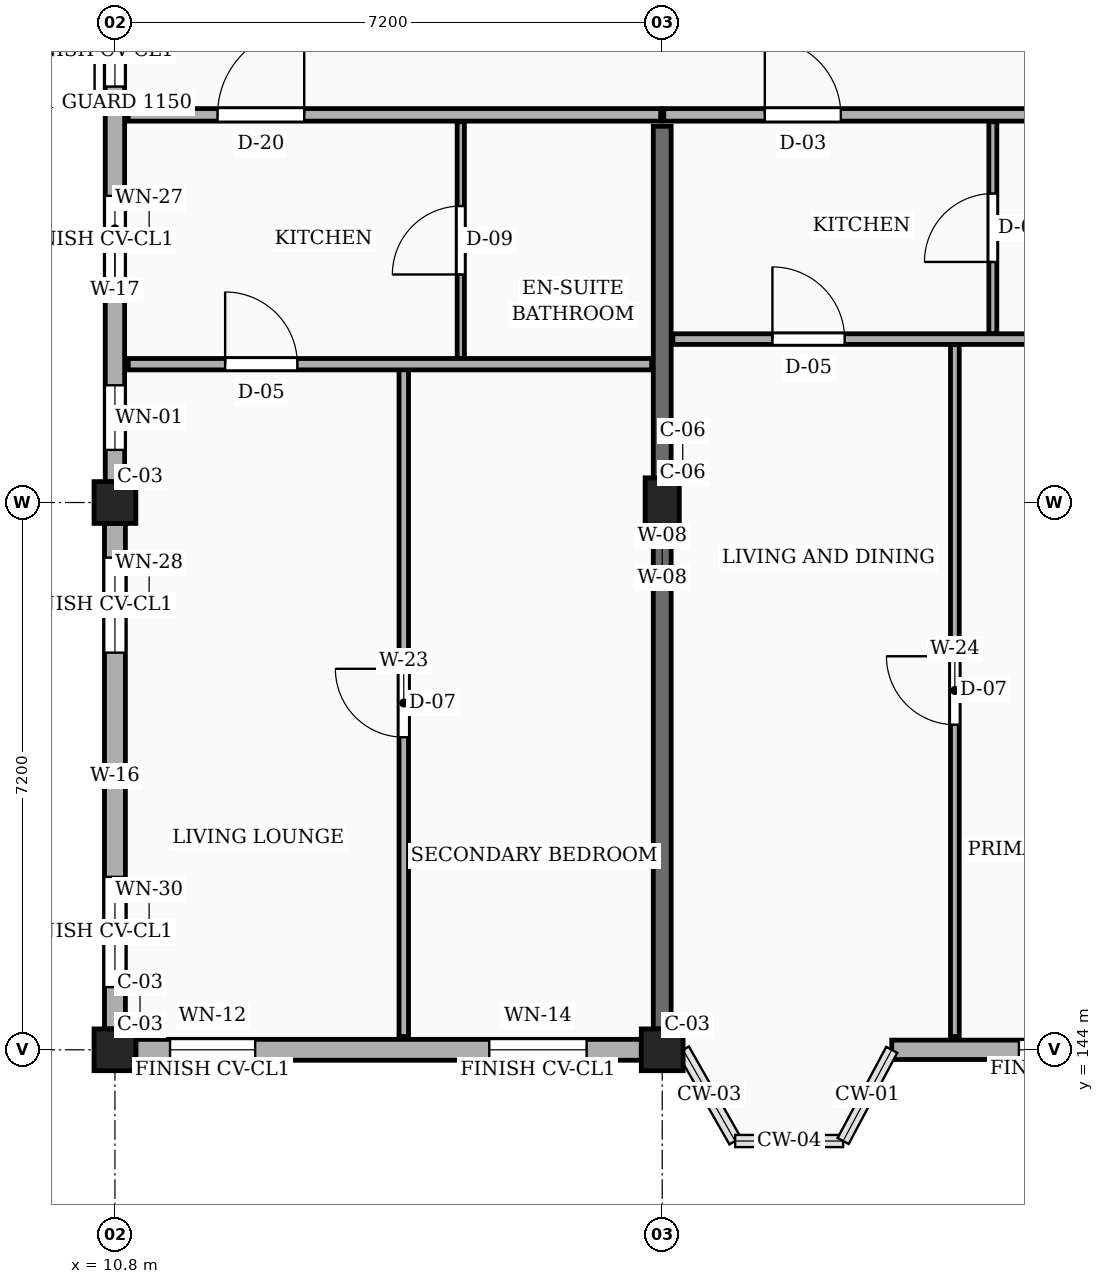
"""IFC4 building model, lengths in metres.
Left out: names, types, materials, properties, quantities, classifications, styles, units other than length and angle.
Written with IfcOpenShell. Run it as: python <this file> out.ifc"""

import sys

from ifc_helpers import new_model, si_unit, direction, frame, frame_2d, origin, origin_2d, place, context, subcontext, project, spatial, rectangle, extrude, element, fill, save


model = new_model("IFC4")
c1 = context("Model", 3, precision=1e-05, world=origin(), true_north=direction((0.0, 1.0)))
c2 = subcontext(c1, "Body", "Model", "MODEL_VIEW")
j1 = project(units=[si_unit("LENGTHUNIT", "METRE"), si_unit("PLANEANGLEUNIT", "RADIAN")], contexts=[c1])
p1 = place(None, origin())
s1 = spatial("IfcSite", under=j1, at=p1, CompositionType="ELEMENT")
p2 = place(p1, origin())
s2 = spatial("IfcBuilding", under=s1, at=p2, CompositionType="ELEMENT")
p3 = place(p2, frame((0.0, 0.0, 13.95)))
s3 = spatial("IfcBuildingStorey", under=s2, at=p3, CompositionType="ELEMENT", Elevation=13.95)
for number, where, z_axis, x_axis in (
    (1, (10.8, 144.0, 0.0), (0.0, 0.0, 1.0), (1.0, 0.0, 0.0)),
    (2, (10.8, 151.2, 0.0), (0.0, 0.0, 1.0), (1.0, 0.0, 0.0)),
    (3, (18.0, 144.0, 0.0), (0.0, 0.0, 1.0), (1.0, 0.0, 0.0)),
):
    element("IfcColumn", number, at=place(p3, frame(where, z_axis=z_axis, x_axis=x_axis)), inside=s3, PredefinedType="COLUMN", context=c2, shape_type="SweptSolid", body=[
        extrude(rectangle(XDim=0.55, YDim=0.55, at=origin_2d()), origin(), (0.0, 0.0, 1.0), 3.15),
    ])
p4 = place(p3, frame((18.0, 151.2, 0.0), z_axis=(0.0, 0.0, 1.0), x_axis=(1.0, 0.0, 0.0)))
e4 = element("IfcColumn", 4, at=p4, inside=s3, PredefinedType="COLUMN", context=c2, shape_type="SweptSolid", body=[
    extrude(rectangle(XDim=0.45, YDim=0.65, at=origin_2d()), origin(), (0.0, 0.0, 1.0), 3.15),
])
p5 = place(p3, frame((18.0, 144.275, 0.0), z_axis=(0.0, 0.0, 1.0), x_axis=(0.0, 1.0, 0.0)))
e5 = element("IfcWall", 5, at=p5, inside=s3, PredefinedType="SOLIDWALL", context=c2, shape_type="SweptSolid", body=[
    extrude(rectangle(XDim=11.875, YDim=0.235, at=frame_2d((5.938, 0.0))), origin(), (0.0, 0.0, 1.0), 2.185),
])
p6 = place(p3, frame((11.075, 144.0, 0.0), z_axis=(0.0, 0.0, 1.0), x_axis=(1.0, 0.0, 0.0)))
e6 = element("IfcWall", 6, at=p6, inside=s3, PredefinedType="SOLIDWALL", context=c2, shape_type="SweptSolid", body=[
    extrude(rectangle(XDim=6.65, YDim=0.275, at=frame_2d((3.325, 0.0))), origin(), (0.0, 0.0, 1.0), 2.455),
])
p7 = place(p6, frame((0.45, 0.0, 0.78)))
e7 = element("IfcOpeningElement", 7, at=p7, cuts=e6, PredefinedType="OPENING", context=c2, shape_type="SweptSolid", body=[
    extrude(rectangle(XDim=1.12, YDim=1.26, at=frame_2d((0.56, 0.63))), frame((0.0, 0.147, 0.0), z_axis=(0.0, -1.0, 0.0), x_axis=(1.0, 0.0, 0.0)), (0.0, 0.0, 1.0), 0.295),
])
p8 = place(p6, frame((4.65, 0.0, 0.78)))
e8 = element("IfcOpeningElement", 8, at=p8, cuts=e6, PredefinedType="OPENING", context=c2, shape_type="SweptSolid", body=[
    extrude(rectangle(XDim=1.28, YDim=1.26, at=frame_2d((0.64, 0.63))), frame((0.0, 0.147, 0.0), z_axis=(0.0, -1.0, 0.0), x_axis=(1.0, 0.0, 0.0)), (0.0, 0.0, 1.0), 0.295),
])
p9 = place(p3, frame((21.02, 144.0, 0.0), z_axis=(0.0, 0.0, 1.0), x_axis=(1.0, 0.0, 0.0)))
e9 = element("IfcWall", 9, at=p9, inside=s3, PredefinedType="SOLIDWALL", context=c2, shape_type="SweptSolid", body=[
    extrude(rectangle(XDim=3.905, YDim=0.255, at=frame_2d((1.953, 0.0))), origin(), (0.0, 0.0, 1.0), 2.455),
])
p10 = place(p9, frame((1.673, 0.0, 0.78)))
e10 = element("IfcOpeningElement", 10, at=p10, cuts=e9, PredefinedType="OPENING", context=c2, shape_type="SweptSolid", body=[
    extrude(rectangle(XDim=1.28, YDim=1.26, at=frame_2d((0.64, 0.63))), frame((0.0, 0.137, 0.0), z_axis=(0.0, -1.0, 0.0), x_axis=(1.0, 0.0, 0.0)), (0.0, 0.0, 1.0), 0.275),
])
p11 = place(p3, frame((10.8, 158.125, 0.0), z_axis=(0.0, 0.0, 1.0), x_axis=(0.0, -1.0, 0.0)))
e11 = element("IfcWall", 11, at=p11, inside=s3, PredefinedType="SOLIDWALL", context=c2, shape_type="SweptSolid", body=[
    extrude(rectangle(XDim=6.65, YDim=0.255, at=frame_2d((3.325, 0.0))), origin(), (0.0, 0.0, 1.0), 2.455),
])
p12 = place(p11, frame((0.512, 0.0, 0.78)))
e12 = element("IfcOpeningElement", 12, at=p12, cuts=e11, PredefinedType="OPENING", context=c2, shape_type="SweptSolid", body=[
    extrude(rectangle(XDim=0.94, YDim=1.44, at=frame_2d((0.47, 0.72))), frame((0.0, 0.137, 0.0), z_axis=(0.0, -1.0, 0.0), x_axis=(1.0, 0.0, 0.0)), (0.0, 0.0, 1.0), 0.275),
])
p13 = place(p11, frame((2.89, 0.0, 0.78)))
e13 = element("IfcOpeningElement", 13, at=p13, cuts=e11, PredefinedType="OPENING", context=c2, shape_type="SweptSolid", body=[
    extrude(rectangle(XDim=1.15, YDim=1.44, at=frame_2d((0.575, 0.72))), frame((0.0, 0.137, 0.0), z_axis=(0.0, -1.0, 0.0), x_axis=(1.0, 0.0, 0.0)), (0.0, 0.0, 1.0), 0.275),
])
p14 = place(p11, frame((5.383, 0.0, 0.78)))
e14 = element("IfcOpeningElement", 14, at=p14, cuts=e11, PredefinedType="OPENING", context=c2, shape_type="SweptSolid", body=[
    extrude(rectangle(XDim=0.85, YDim=1.15, at=frame_2d((0.425, 0.575))), frame((0.0, 0.137, 0.0), z_axis=(0.0, -1.0, 0.0), x_axis=(1.0, 0.0, 0.0)), (0.0, 0.0, 1.0), 0.275),
])
p15 = place(p3, frame((10.8, 150.925, 0.0), z_axis=(0.0, 0.0, 1.0), x_axis=(0.0, -1.0, 0.0)))
e15 = element("IfcWall", 15, at=p15, inside=s3, PredefinedType="SOLIDWALL", context=c2, shape_type="SweptSolid", body=[
    extrude(rectangle(XDim=6.65, YDim=0.275, at=frame_2d((3.325, 0.0))), origin(), (0.0, 0.0, 1.0), 2.455),
])
p16 = place(p15, frame((0.45, 0.0, 0.78)))
e16 = element("IfcOpeningElement", 16, at=p16, cuts=e15, PredefinedType="OPENING", context=c2, shape_type="SweptSolid", body=[
    extrude(rectangle(XDim=1.25, YDim=1.44, at=frame_2d((0.625, 0.72))), frame((0.0, 0.147, 0.0), z_axis=(0.0, -1.0, 0.0), x_axis=(1.0, 0.0, 0.0)), (0.0, 0.0, 1.0), 0.295),
])
p17 = place(p15, frame((4.65, 0.0, 0.78)))
e17 = element("IfcOpeningElement", 17, at=p17, cuts=e15, PredefinedType="OPENING", context=c2, shape_type="SweptSolid", body=[
    extrude(rectangle(XDim=1.45, YDim=1.44, at=frame_2d((0.725, 0.72))), frame((0.0, 0.147, 0.0), z_axis=(0.0, -1.0, 0.0), x_axis=(1.0, 0.0, 0.0)), (0.0, 0.0, 1.0), 0.295),
])
p18 = place(p3, frame((10.975, 156.3, 0.0), z_axis=(0.0, 0.0, 1.0), x_axis=(1.0, 0.0, 0.0)))
e18 = element("IfcWall", 18, at=p18, inside=s3, PredefinedType="PARTITIONING", context=c2, shape_type="SweptSolid", body=[
    extrude(rectangle(XDim=7.005, YDim=0.165, at=frame_2d((3.502, 0.0))), origin(), (0.0, 0.0, 1.0), 2.32),
])
p19 = place(p18, frame((1.175, 0.0, 0.0)))
e19 = element("IfcOpeningElement", 19, at=p19, cuts=e18, PredefinedType="OPENING", context=c2, shape_type="SweptSolid", body=[
    extrude(rectangle(XDim=1.14, YDim=2.18, at=frame_2d((0.57, 1.09))), frame((0.0, 0.093, 0.0), z_axis=(0.0, -1.0, 0.0), x_axis=(1.0, 0.0, 0.0)), (0.0, 0.0, 1.0), 0.185),
])
p20 = place(p3, frame((18.02, 156.3, 0.0), z_axis=(0.0, 0.0, 1.0), x_axis=(1.0, 0.0, 0.0)))
e20 = element("IfcWall", 20, at=p20, inside=s3, PredefinedType="PARTITIONING", context=c2, shape_type="SweptSolid", body=[
    extrude(rectangle(XDim=7.16, YDim=0.165, at=frame_2d((3.58, 0.0))), origin(), (0.0, 0.0, 1.0), 2.32),
])
p21 = place(p20, frame((1.33, 0.0, 0.0)))
e21 = element("IfcOpeningElement", 21, at=p21, cuts=e20, PredefinedType="OPENING", context=c2, shape_type="SweptSolid", body=[
    extrude(rectangle(XDim=1.0, YDim=2.15, at=frame_2d((0.5, 1.075))), frame((0.0, 0.093, 0.0), z_axis=(0.0, -1.0, 0.0), x_axis=(1.0, 0.0, 0.0)), (0.0, 0.0, 1.0), 0.185),
])
p22 = place(p3, frame((14.6, 144.175, 0.0), z_axis=(0.0, 0.0, 1.0), x_axis=(0.0, 1.0, 0.0)))
e22 = element("IfcWall", 22, at=p22, inside=s3, PredefinedType="PARTITIONING", context=c2, shape_type="SweptSolid", body=[
    extrude(rectangle(XDim=8.775, YDim=0.125, at=frame_2d((4.387, 0.0))), origin(), (0.0, 0.0, 1.0), 2.32),
])
p23 = place(p22, frame((3.938, 0.0, 0.0)))
e23 = element("IfcOpeningElement", 23, at=p23, cuts=e22, PredefinedType="OPENING", context=c2, shape_type="SweptSolid", body=[
    extrude(rectangle(XDim=0.9, YDim=2.1, at=frame_2d((0.45, 1.05))), frame((0.0, 0.073, 0.0), z_axis=(0.0, -1.0, 0.0), x_axis=(1.0, 0.0, 0.0)), (0.0, 0.0, 1.0), 0.145),
])
p24 = place(p3, frame((15.35, 153.09, 0.0), z_axis=(0.0, 0.0, 1.0), x_axis=(0.0, 1.0, 0.0)))
e24 = element("IfcWall", 24, at=p24, inside=s3, PredefinedType="PARTITIONING", context=c2, shape_type="SweptSolid", body=[
    extrude(rectangle(XDim=3.12, YDim=0.095, at=frame_2d((1.56, 0.0))), origin(), (0.0, 0.0, 1.0), 2.32),
])
p25 = place(p24, frame((1.11, 0.0, 0.0)))
e25 = element("IfcOpeningElement", 25, at=p25, cuts=e24, PredefinedType="OPENING", context=c2, shape_type="SweptSolid", body=[
    extrude(rectangle(XDim=0.9, YDim=2.05, at=frame_2d((0.45, 1.025))), frame((0.0, 0.058, 0.0), z_axis=(0.0, -1.0, 0.0), x_axis=(1.0, 0.0, 0.0)), (0.0, 0.0, 1.0), 0.115),
])
p26 = place(p3, frame((10.975, 153.02, 0.0), z_axis=(0.0, 0.0, 1.0), x_axis=(1.0, 0.0, 0.0)))
e26 = element("IfcWall", 26, at=p26, inside=s3, PredefinedType="PARTITIONING", context=c2, shape_type="SweptSolid", body=[
    extrude(rectangle(XDim=6.885, YDim=0.15, at=frame_2d((3.442, 0.0))), origin(), (0.0, 0.0, 1.0), 2.32),
])
p27 = place(p26, frame((1.275, 0.0, 0.0)))
e27 = element("IfcOpeningElement", 27, at=p27, cuts=e26, PredefinedType="OPENING", context=c2, shape_type="SweptSolid", body=[
    extrude(rectangle(XDim=0.95, YDim=2.1, at=frame_2d((0.475, 1.05))), frame((0.0, 0.085, 0.0), z_axis=(0.0, -1.0, 0.0), x_axis=(1.0, 0.0, 0.0)), (0.0, 0.0, 1.0), 0.17),
])
p28 = place(p3, frame((21.85, 144.175, 0.0), z_axis=(0.0, 0.0, 1.0), x_axis=(0.0, 1.0, 0.0)))
e28 = element("IfcWall", 28, at=p28, inside=s3, PredefinedType="PARTITIONING", context=c2, shape_type="SweptSolid", body=[
    extrude(rectangle(XDim=9.105, YDim=0.115, at=frame_2d((4.552, 0.0))), origin(), (0.0, 0.0, 1.0), 2.32),
])
p29 = place(p28, frame((4.103, 0.0, 0.0)))
e29 = element("IfcOpeningElement", 29, at=p29, cuts=e28, PredefinedType="OPENING", context=c2, shape_type="SweptSolid", body=[
    extrude(rectangle(XDim=0.9, YDim=2.1, at=frame_2d((0.45, 1.05))), frame((0.0, 0.067, 0.0), z_axis=(0.0, -1.0, 0.0), x_axis=(1.0, 0.0, 0.0)), (0.0, 0.0, 1.0), 0.135),
])
p30 = place(p3, frame((22.35, 153.42, 0.0), z_axis=(0.0, 0.0, 1.0), x_axis=(0.0, 1.0, 0.0)))
e30 = element("IfcWall", 30, at=p30, inside=s3, PredefinedType="PARTITIONING", context=c2, shape_type="SweptSolid", body=[
    extrude(rectangle(XDim=2.79, YDim=0.105, at=frame_2d((1.395, 0.0))), origin(), (0.0, 0.0, 1.0), 2.32),
])
p31 = place(p30, frame((0.945, 0.0, 0.0)))
e31 = element("IfcOpeningElement", 31, at=p31, cuts=e30, PredefinedType="OPENING", context=c2, shape_type="SweptSolid", body=[
    extrude(rectangle(XDim=0.9, YDim=2.05, at=frame_2d((0.45, 1.025))), frame((0.0, 0.062, 0.0), z_axis=(0.0, -1.0, 0.0), x_axis=(1.0, 0.0, 0.0)), (0.0, 0.0, 1.0), 0.125),
])
p32 = place(p3, frame((18.14, 153.35, 0.0), z_axis=(0.0, 0.0, 1.0), x_axis=(1.0, 0.0, 0.0)))
e32 = element("IfcWall", 32, at=p32, inside=s3, PredefinedType="PARTITIONING", context=c2, shape_type="SweptSolid", body=[
    extrude(rectangle(XDim=6.92, YDim=0.14, at=frame_2d((3.46, 0.0))), origin(), (0.0, 0.0, 1.0), 2.32),
])
p33 = place(p32, frame((1.31, 0.0, 0.0)))
e33 = element("IfcOpeningElement", 33, at=p33, cuts=e32, PredefinedType="OPENING", context=c2, shape_type="SweptSolid", body=[
    extrude(rectangle(XDim=0.95, YDim=2.1, at=frame_2d((0.475, 1.05))), frame((0.0, 0.08, 0.0), z_axis=(0.0, -1.0, 0.0), x_axis=(1.0, 0.0, 0.0)), (0.0, 0.0, 1.0), 0.16),
])
p34 = place(p7, origin())
e34 = element("IfcWindow", 34, at=p34, inside=s3, PartitioningType="SINGLE_PANEL", PredefinedType="WINDOW", context=c2, shape_type="SweptSolid", body=[
    extrude(rectangle(XDim=1.12, YDim=1.26, at=frame_2d((0.56, 0.63))), frame((0.0, 0.03, 0.0), z_axis=(0.0, -1.0, 0.0), x_axis=(1.0, 0.0, 0.0)), (0.0, 0.0, 1.0), 0.06),
])
fill(e7, e34)
p35 = place(p8, origin())
e35 = element("IfcWindow", 35, at=p35, inside=s3, PartitioningType="SINGLE_PANEL", PredefinedType="WINDOW", context=c2, shape_type="SweptSolid", body=[
    extrude(rectangle(XDim=1.28, YDim=1.26, at=frame_2d((0.64, 0.63))), frame((0.0, 0.03, 0.0), z_axis=(0.0, -1.0, 0.0), x_axis=(1.0, 0.0, 0.0)), (0.0, 0.0, 1.0), 0.06),
])
fill(e8, e35)
p36 = place(p10, origin())
e36 = element("IfcWindow", 36, at=p36, inside=s3, PartitioningType="SINGLE_PANEL", PredefinedType="WINDOW", context=c2, shape_type="SweptSolid", body=[
    extrude(rectangle(XDim=1.28, YDim=1.26, at=frame_2d((0.64, 0.63))), frame((0.0, 0.03, 0.0), z_axis=(0.0, -1.0, 0.0), x_axis=(1.0, 0.0, 0.0)), (0.0, 0.0, 1.0), 0.06),
])
fill(e10, e36)
p37 = place(p12, origin())
e37 = element("IfcWindow", 37, at=p37, inside=s3, PartitioningType="SINGLE_PANEL", PredefinedType="WINDOW", context=c2, shape_type="SweptSolid", body=[
    extrude(rectangle(XDim=0.94, YDim=1.44, at=frame_2d((0.47, 0.72))), frame((0.0, 0.03, 0.0), z_axis=(0.0, -1.0, 0.0), x_axis=(1.0, 0.0, 0.0)), (0.0, 0.0, 1.0), 0.06),
])
fill(e12, e37)
p38 = place(p13, origin())
e38 = element("IfcWindow", 38, at=p38, inside=s3, PartitioningType="SINGLE_PANEL", PredefinedType="WINDOW", context=c2, shape_type="SweptSolid", body=[
    extrude(rectangle(XDim=1.15, YDim=1.44, at=frame_2d((0.575, 0.72))), frame((0.0, 0.03, 0.0), z_axis=(0.0, -1.0, 0.0), x_axis=(1.0, 0.0, 0.0)), (0.0, 0.0, 1.0), 0.06),
])
fill(e13, e38)
p39 = place(p14, origin())
e39 = element("IfcWindow", 39, at=p39, inside=s3, PartitioningType="SINGLE_PANEL", PredefinedType="WINDOW", context=c2, shape_type="SweptSolid", body=[
    extrude(rectangle(XDim=0.85, YDim=1.15, at=frame_2d((0.425, 0.575))), frame((0.0, 0.03, 0.0), z_axis=(0.0, -1.0, 0.0), x_axis=(1.0, 0.0, 0.0)), (0.0, 0.0, 1.0), 0.06),
])
fill(e14, e39)
p40 = place(p16, origin())
e40 = element("IfcWindow", 40, at=p40, inside=s3, PartitioningType="SINGLE_PANEL", PredefinedType="WINDOW", context=c2, shape_type="SweptSolid", body=[
    extrude(rectangle(XDim=1.25, YDim=1.44, at=frame_2d((0.625, 0.72))), frame((0.0, 0.03, 0.0), z_axis=(0.0, -1.0, 0.0), x_axis=(1.0, 0.0, 0.0)), (0.0, 0.0, 1.0), 0.06),
])
fill(e16, e40)
p41 = place(p17, origin())
e41 = element("IfcWindow", 41, at=p41, inside=s3, PartitioningType="SINGLE_PANEL", PredefinedType="WINDOW", context=c2, shape_type="SweptSolid", body=[
    extrude(rectangle(XDim=1.45, YDim=1.44, at=frame_2d((0.725, 0.72))), frame((0.0, 0.03, 0.0), z_axis=(0.0, -1.0, 0.0), x_axis=(1.0, 0.0, 0.0)), (0.0, 0.0, 1.0), 0.06),
])
fill(e17, e41)
p42 = place(p19, origin())
e42 = element("IfcDoor", 42, at=p42, inside=s3, OperationType="SINGLE_SWING_RIGHT", PredefinedType="DOOR", context=c2, shape_type="SweptSolid", body=[
    extrude(rectangle(XDim=1.14, YDim=2.18, at=frame_2d((0.57, 1.09))), frame((0.0, 0.025, 0.0), z_axis=(0.0, -1.0, 0.0), x_axis=(1.0, 0.0, 0.0)), (0.0, 0.0, 1.0), 0.05),
])
fill(e19, e42)
p43 = place(p21, origin())
e43 = element("IfcDoor", 43, at=p43, inside=s3, OperationType="SINGLE_SWING_LEFT", PredefinedType="DOOR", context=c2, shape_type="SweptSolid", body=[
    extrude(rectangle(XDim=1.0, YDim=2.15, at=frame_2d((0.5, 1.075))), frame((0.0, 0.025, 0.0), z_axis=(0.0, -1.0, 0.0), x_axis=(1.0, 0.0, 0.0)), (0.0, 0.0, 1.0), 0.05),
])
fill(e21, e43)
p44 = place(p23, origin())
e44 = element("IfcDoor", 44, at=p44, inside=s3, OperationType="SINGLE_SWING_RIGHT", PredefinedType="DOOR", context=c2, shape_type="SweptSolid", body=[
    extrude(rectangle(XDim=0.9, YDim=2.1, at=frame_2d((0.45, 1.05))), frame((0.0, 0.025, 0.0), z_axis=(0.0, -1.0, 0.0), x_axis=(1.0, 0.0, 0.0)), (0.0, 0.0, 1.0), 0.05),
])
fill(e23, e44)
p45 = place(p25, origin())
e45 = element("IfcDoor", 45, at=p45, inside=s3, OperationType="SINGLE_SWING_LEFT", PredefinedType="DOOR", context=c2, shape_type="SweptSolid", body=[
    extrude(rectangle(XDim=0.9, YDim=2.05, at=frame_2d((0.45, 1.025))), frame((0.0, 0.025, 0.0), z_axis=(0.0, -1.0, 0.0), x_axis=(1.0, 0.0, 0.0)), (0.0, 0.0, 1.0), 0.05),
])
fill(e25, e45)
p46 = place(p27, origin())
e46 = element("IfcDoor", 46, at=p46, inside=s3, OperationType="SINGLE_SWING_LEFT", PredefinedType="DOOR", context=c2, shape_type="SweptSolid", body=[
    extrude(rectangle(XDim=0.95, YDim=2.1, at=frame_2d((0.475, 1.05))), frame((0.0, 0.025, 0.0), z_axis=(0.0, -1.0, 0.0), x_axis=(1.0, 0.0, 0.0)), (0.0, 0.0, 1.0), 0.05),
])
fill(e27, e46)
p47 = place(p29, origin())
e47 = element("IfcDoor", 47, at=p47, inside=s3, OperationType="SINGLE_SWING_RIGHT", PredefinedType="DOOR", context=c2, shape_type="SweptSolid", body=[
    extrude(rectangle(XDim=0.9, YDim=2.1, at=frame_2d((0.45, 1.05))), frame((0.0, 0.025, 0.0), z_axis=(0.0, -1.0, 0.0), x_axis=(1.0, 0.0, 0.0)), (0.0, 0.0, 1.0), 0.05),
])
fill(e29, e47)
p48 = place(p31, origin())
e48 = element("IfcDoor", 48, at=p48, inside=s3, OperationType="SINGLE_SWING_LEFT", PredefinedType="DOOR", context=c2, shape_type="SweptSolid", body=[
    extrude(rectangle(XDim=0.9, YDim=2.05, at=frame_2d((0.45, 1.025))), frame((0.0, 0.025, 0.0), z_axis=(0.0, -1.0, 0.0), x_axis=(1.0, 0.0, 0.0)), (0.0, 0.0, 1.0), 0.05),
])
fill(e31, e48)
p49 = place(p33, origin())
e49 = element("IfcDoor", 49, at=p49, inside=s3, OperationType="SINGLE_SWING_LEFT", PredefinedType="DOOR", context=c2, shape_type="SweptSolid", body=[
    extrude(rectangle(XDim=0.95, YDim=2.1, at=frame_2d((0.475, 1.05))), frame((0.0, 0.025, 0.0), z_axis=(0.0, -1.0, 0.0), x_axis=(1.0, 0.0, 0.0)), (0.0, 0.0, 1.0), 0.05),
])
fill(e33, e49)
save(model, sys.argv[1])
